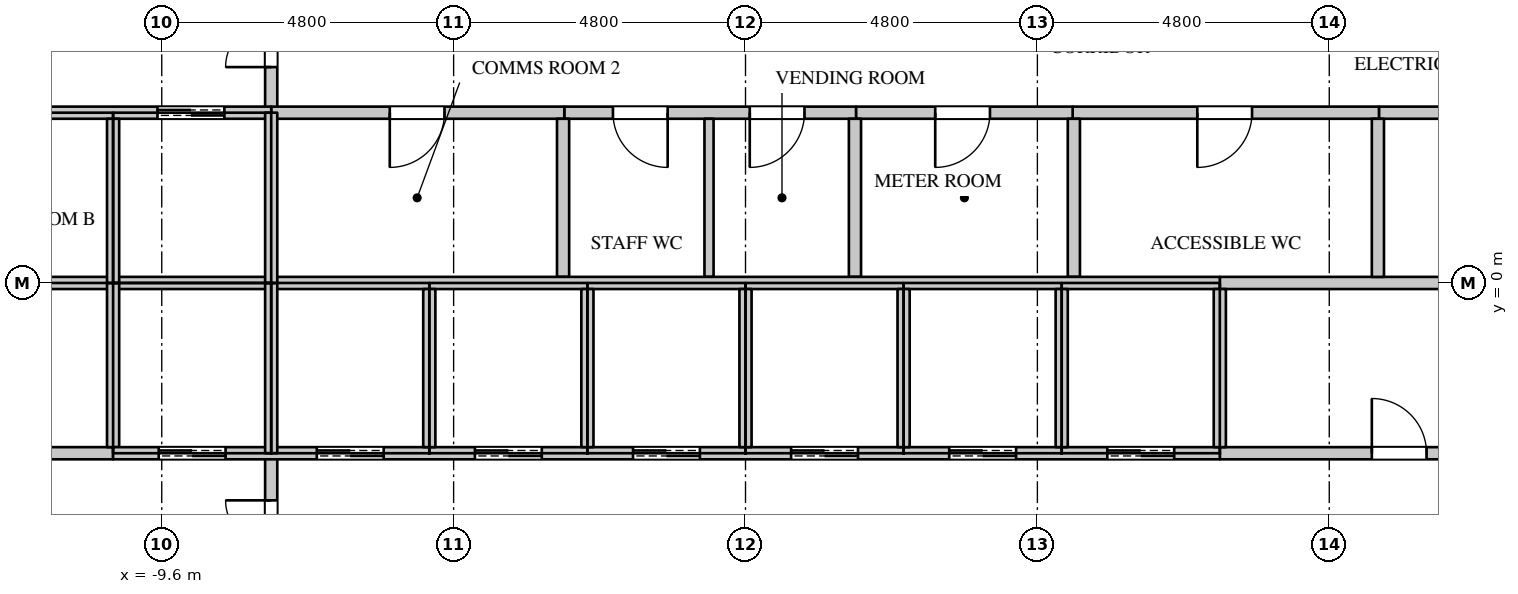
"""IFC4 building model, lengths in metres.
Left out: names, types, materials, properties, quantities, classifications, styles, units other than length and angle.
Written with IfcOpenShell. Run it as: python <this file> out.ifc"""

import sys

from ifc_helpers import new_model, si_unit, direction, frame, frame_2d, origin, place, context, subcontext, project, spatial, rectangle, extrude, element, fill, save


model = new_model("IFC4")
c1 = context("Model", 3, precision=1e-05, world=origin(), true_north=direction((0.0, 1.0)))
c2 = subcontext(c1, "Body", "Model", "MODEL_VIEW")
j1 = project(units=[si_unit("LENGTHUNIT", "METRE"), si_unit("PLANEANGLEUNIT", "RADIAN")], contexts=[c1])
p1 = place(None, origin())
s1 = spatial("IfcSite", under=j1, at=p1, CompositionType="ELEMENT")
p2 = place(p1, origin())
s2 = spatial("IfcBuilding", under=s1, at=p2, CompositionType="ELEMENT")
p3 = place(p2, frame((0.0, 0.0, 187.5)))
s3 = spatial("IfcBuildingStorey", under=s2, at=p3, CompositionType="ELEMENT", Elevation=187.5)
p4 = place(p3, frame((-7.8, -8.075, 0.0), z_axis=(0.0, 0.0, 1.0), x_axis=(0.0, 1.0, 0.0)))
e1 = element("IfcWall", 1, at=p4, inside=s3, PredefinedType="PARTITIONING", context=c2, shape_type="SweptSolid", body=[
    extrude(rectangle(XDim=5.275, YDim=0.2, at=frame_2d((2.637, 0.0))), origin(), (0.0, 0.0, 1.0), 3.95),
])
p5 = place(p4, frame((3.0, 0.0, 0.0)))
e2 = element("IfcOpeningElement", 2, at=p5, cuts=e1, PredefinedType="OPENING", context=c2, shape_type="SweptSolid", body=[
    extrude(rectangle(XDim=1.5, YDim=2.4, at=frame_2d((0.75, 1.2))), frame((0.0, 0.11, 0.0), z_axis=(0.0, -1.0, 0.0), x_axis=(1.0, 0.0, 0.0)), (0.0, 0.0, 1.0), 0.22),
])
p6 = place(p3, frame((-7.8, 2.8, 0.0), z_axis=(0.0, 0.0, 1.0), x_axis=(0.0, 1.0, 0.0)))
e3 = element("IfcWall", 3, at=p6, inside=s3, PredefinedType="PARTITIONING", context=c2, shape_type="SweptSolid", body=[
    extrude(rectangle(XDim=5.275, YDim=0.2, at=frame_2d((2.637, 0.0))), origin(), (0.0, 0.0, 1.0), 3.95),
])
p7 = place(p6, frame((0.75, 0.0, 0.0)))
e4 = element("IfcOpeningElement", 4, at=p7, cuts=e3, PredefinedType="OPENING", context=c2, shape_type="SweptSolid", body=[
    extrude(rectangle(XDim=1.5, YDim=2.4, at=frame_2d((0.75, 1.2))), frame((0.0, 0.11, 0.0), z_axis=(0.0, -1.0, 0.0), x_axis=(1.0, 0.0, 0.0)), (0.0, 0.0, 1.0), 0.22),
])
p8 = place(p3, frame((-2.98, 2.8, 0.0), z_axis=(0.0, 0.0, 1.0), x_axis=(1.0, 0.0, 0.0)))
e5 = element("IfcWall", 5, at=p8, inside=s3, PredefinedType="PARTITIONING", context=c2, shape_type="SweptSolid", body=[
    extrude(rectangle(XDim=4.8, YDim=0.2, at=frame_2d((2.4, 0.0))), origin(), (0.0, 0.0, 1.0), 3.95),
])
p9 = place(p8, frame((0.8, 0.0, 0.0)))
e6 = element("IfcOpeningElement", 6, at=p9, cuts=e5, PredefinedType="OPENING", context=c2, shape_type="SweptSolid", body=[
    extrude(rectangle(XDim=0.9, YDim=2.2, at=frame_2d((0.45, 1.1))), frame((0.0, 0.11, 0.0), z_axis=(0.0, -1.0, 0.0), x_axis=(1.0, 0.0, 0.0)), (0.0, 0.0, 1.0), 0.22),
])
p10 = place(p8, frame((3.05, 0.0, 0.0)))
e7 = element("IfcOpeningElement", 7, at=p10, cuts=e5, PredefinedType="OPENING", context=c2, shape_type="SweptSolid", body=[
    extrude(rectangle(XDim=0.9, YDim=2.2, at=frame_2d((0.45, 1.1))), frame((0.0, 0.11, 0.0), z_axis=(0.0, -1.0, 0.0), x_axis=(1.0, 0.0, 0.0)), (0.0, 0.0, 1.0), 0.22),
])
p11 = place(p3, frame((5.38, 2.8, 0.0), z_axis=(0.0, 0.0, 1.0), x_axis=(1.0, 0.0, 0.0)))
e8 = element("IfcWall", 8, at=p11, inside=s3, PredefinedType="PARTITIONING", context=c2, shape_type="SweptSolid", body=[
    extrude(rectangle(XDim=5.04, YDim=0.2, at=frame_2d((2.52, 0.0))), origin(), (0.0, 0.0, 1.0), 3.95),
])
p12 = place(p11, frame((2.05, 0.0, 0.0)))
e9 = element("IfcOpeningElement", 9, at=p12, cuts=e8, PredefinedType="OPENING", context=c2, shape_type="SweptSolid", body=[
    extrude(rectangle(XDim=0.9, YDim=2.2, at=frame_2d((0.45, 1.1))), frame((0.0, 0.11, 0.0), z_axis=(0.0, -1.0, 0.0), x_axis=(1.0, 0.0, 0.0)), (0.0, 0.0, 1.0), 0.22),
])
p13 = place(p3, frame((-0.6, 0.1, 0.0), z_axis=(0.0, 0.0, 1.0), x_axis=(0.0, 1.0, 0.0)))
e10 = element("IfcWall", 10, at=p13, inside=s3, PredefinedType="PARTITIONING", context=c2, shape_type="SweptSolid", body=[
    extrude(rectangle(XDim=2.6, YDim=0.15, at=frame_2d((1.3, 0.0))), origin(), (0.0, 0.0, 1.0), 3.95),
])
p14 = place(p3, frame((-13.67, -2.8, 0.0), z_axis=(0.0, 0.0, 1.0), x_axis=(1.0, 0.0, 0.0)))
e11 = element("IfcWall", 11, at=p14, inside=s3, PredefinedType="PARTITIONING", context=c2, shape_type="SweptSolid", body=[
    extrude(rectangle(XDim=3.27, YDim=0.2, at=frame_2d((1.635, 0.0))), origin(), (0.0, 0.0, 1.0), 3.95),
])
p15 = place(p14, frame((1.3, 0.0, 0.0)))
e12 = element("IfcOpeningElement", 12, at=p15, cuts=e11, PredefinedType="OPENING", context=c2, shape_type="SweptSolid", body=[
    extrude(rectangle(XDim=0.6, YDim=2.0, at=frame_2d((0.3, 1.0))), frame((0.0, 0.11, 0.0), z_axis=(0.0, -1.0, 0.0), x_axis=(1.0, 0.0, 0.0)), (0.0, 0.0, 1.0), 0.22),
])
p16 = place(p3, frame((-7.8, 2.8, 0.0), z_axis=(0.0, 0.0, 1.0), x_axis=(1.0, 0.0, 0.0)))
e13 = element("IfcWall", 13, at=p16, inside=s3, PredefinedType="PARTITIONING", context=c2, shape_type="SweptSolid", body=[
    extrude(rectangle(XDim=4.82, YDim=0.2, at=frame_2d((2.41, 0.0))), origin(), (0.0, 0.0, 1.0), 3.95),
])
p17 = place(p16, frame((1.95, 0.0, 0.0)))
e14 = element("IfcOpeningElement", 14, at=p17, cuts=e13, PredefinedType="OPENING", context=c2, shape_type="SweptSolid", body=[
    extrude(rectangle(XDim=0.9, YDim=2.2, at=frame_2d((0.45, 1.1))), frame((0.0, 0.11, 0.0), z_axis=(0.0, -1.0, 0.0), x_axis=(1.0, 0.0, 0.0)), (0.0, 0.0, 1.0), 0.22),
])
p18 = place(p3, frame((-3.0, 0.1, 0.0), z_axis=(0.0, 0.0, 1.0), x_axis=(0.0, 1.0, 0.0)))
e15 = element("IfcWall", 15, at=p18, inside=s3, PredefinedType="PARTITIONING", context=c2, shape_type="SweptSolid", body=[
    extrude(rectangle(XDim=2.6, YDim=0.2, at=frame_2d((1.3, 0.0))), origin(), (0.0, 0.0, 1.0), 3.95),
])
p19 = place(p3, frame((1.82, 2.8, 0.0), z_axis=(0.0, 0.0, 1.0), x_axis=(1.0, 0.0, 0.0)))
e16 = element("IfcWall", 16, at=p19, inside=s3, PredefinedType="PARTITIONING", context=c2, shape_type="SweptSolid", body=[
    extrude(rectangle(XDim=3.56, YDim=0.2, at=frame_2d((1.78, 0.0))), origin(), (0.0, 0.0, 1.0), 3.95),
])
p20 = place(p19, frame((1.3, 0.0, 0.0)))
e17 = element("IfcOpeningElement", 17, at=p20, cuts=e16, PredefinedType="OPENING", context=c2, shape_type="SweptSolid", body=[
    extrude(rectangle(XDim=0.9, YDim=2.2, at=frame_2d((0.45, 1.1))), frame((0.0, 0.11, 0.0), z_axis=(0.0, -1.0, 0.0), x_axis=(1.0, 0.0, 0.0)), (0.0, 0.0, 1.0), 0.22),
])
for number, where, z_axis, x_axis in (
    (18, (1.8, 0.1, 0.0), (0.0, 0.0, 1.0), (0.0, 1.0, 0.0)),
    (19, (5.4, 0.1, 0.0), (0.0, 0.0, 1.0), (0.0, 1.0, 0.0)),
):
    element("IfcWall", number, at=place(p3, frame(where, z_axis=z_axis, x_axis=x_axis)), inside=s3, PredefinedType="PARTITIONING", context=c2, shape_type="SweptSolid", body=[
        extrude(rectangle(XDim=2.6, YDim=0.2, at=frame_2d((1.3, 0.0))), origin(), (0.0, 0.0, 1.0), 3.95),
    ])
p21 = place(p3, frame((7.8, -2.8, 0.0), z_axis=(0.0, 0.0, 1.0), x_axis=(1.0, 0.0, 0.0)))
e20 = element("IfcWall", 20, at=p21, inside=s3, PredefinedType="PARTITIONING", context=c2, shape_type="SweptSolid", body=[
    extrude(rectangle(XDim=5.87, YDim=0.2, at=frame_2d((2.935, 0.0))), origin(), (0.0, 0.0, 1.0), 3.95),
])
p22 = place(p21, frame((2.5, 0.0, 0.0)))
e21 = element("IfcOpeningElement", 21, at=p22, cuts=e20, PredefinedType="OPENING", context=c2, shape_type="SweptSolid", body=[
    extrude(rectangle(XDim=0.9, YDim=2.2, at=frame_2d((0.45, 1.1))), frame((0.0, 0.11, 0.0), z_axis=(0.0, -1.0, 0.0), x_axis=(1.0, 0.0, 0.0)), (0.0, 0.0, 1.0), 0.22),
])
p23 = place(p3, frame((7.8, 0.0, 0.0), z_axis=(0.0, 0.0, 1.0), x_axis=(1.0, 0.0, 0.0)))
e22 = element("IfcWall", 22, at=p23, inside=s3, PredefinedType="PARTITIONING", context=c2, shape_type="SweptSolid", body=[
    extrude(rectangle(XDim=5.87, YDim=0.2, at=frame_2d((2.935, 0.0))), origin(), (0.0, 0.0, 1.0), 3.95),
])
p24 = place(p3, frame((10.42, 2.8, 0.0), z_axis=(0.0, 0.0, 1.0), x_axis=(1.0, 0.0, 0.0)))
e23 = element("IfcWall", 23, at=p24, inside=s3, PredefinedType="PARTITIONING", context=c2, shape_type="SweptSolid", body=[
    extrude(rectangle(XDim=3.25, YDim=0.2, at=frame_2d((1.625, 0.0))), origin(), (0.0, 0.0, 1.0), 3.95),
])
p25 = place(p24, frame((1.3, 0.0, 0.0)))
e24 = element("IfcOpeningElement", 24, at=p25, cuts=e23, PredefinedType="OPENING", context=c2, shape_type="SweptSolid", body=[
    extrude(rectangle(XDim=0.6, YDim=2.0, at=frame_2d((0.3, 1.0))), frame((0.0, 0.11, 0.0), z_axis=(0.0, -1.0, 0.0), x_axis=(1.0, 0.0, 0.0)), (0.0, 0.0, 1.0), 0.22),
])
p26 = place(p3, frame((10.4, 0.1, 0.0), z_axis=(0.0, 0.0, 1.0), x_axis=(0.0, 1.0, 0.0)))
e25 = element("IfcWall", 25, at=p26, inside=s3, PredefinedType="PARTITIONING", context=c2, shape_type="SweptSolid", body=[
    extrude(rectangle(XDim=2.6, YDim=0.2, at=frame_2d((1.3, 0.0))), origin(), (0.0, 0.0, 1.0), 3.95),
])
p27 = place(p3, frame((-13.67, 0.0, 0.0), z_axis=(0.0, 0.0, 1.0), x_axis=(1.0, 0.0, 0.0)))
e26 = element("IfcWall", 26, at=p27, inside=s3, PredefinedType="PARTITIONING", context=c2, shape_type="SweptSolid", body=[
    extrude(rectangle(XDim=21.47, YDim=0.2, at=frame_2d((10.735, 0.0))), origin(), (0.0, 0.0, 1.0), 3.95),
])
p28 = place(p3, frame((-13.67, 2.8, 0.0), z_axis=(0.0, 0.0, 1.0), x_axis=(1.0, 0.0, 0.0)))
e27 = element("IfcWall", 27, at=p28, inside=s3, PredefinedType="PARTITIONING", context=c2, shape_type="SweptSolid", body=[
    extrude(rectangle(XDim=5.87, YDim=0.2, at=frame_2d((2.935, 0.0))), origin(), (0.0, 0.0, 1.0), 3.95),
])
p29 = place(p28, frame((1.05, 0.0, 0.0)))
e28 = element("IfcOpeningElement", 28, at=p29, cuts=e27, PredefinedType="OPENING", context=c2, shape_type="SweptSolid", body=[
    extrude(rectangle(XDim=1.1, YDim=2.2, at=frame_2d((0.55, 1.1))), frame((0.0, 0.11, 0.0), z_axis=(0.0, -1.0, 0.0), x_axis=(1.0, 0.0, 0.0)), (0.0, 0.0, 1.0), 0.22),
])
p30 = place(p28, frame((4.0, 0.0, 0.0)))
e29 = element("IfcOpeningElement", 29, at=p30, cuts=e27, PredefinedType="OPENING", context=c2, shape_type="SweptSolid", body=[
    extrude(rectangle(XDim=1.1, YDim=2.2, at=frame_2d((0.55, 1.1))), frame((0.0, 0.11, 0.0), z_axis=(0.0, -1.0, 0.0), x_axis=(1.0, 0.0, 0.0)), (0.0, 0.0, 1.0), 0.22),
])
p31 = place(p3, frame((-10.4, -2.7, 0.0), z_axis=(0.0, 0.0, 1.0), x_axis=(0.0, 1.0, 0.0)))
e30 = element("IfcWall", 30, at=p31, inside=s3, PredefinedType="PARTITIONING", context=c2, shape_type="SweptSolid", body=[
    extrude(rectangle(XDim=2.7, YDim=0.2, at=frame_2d((1.35, 0.0))), origin(), (0.0, 0.0, 1.0), 3.95),
])
p32 = place(p3, frame((-10.4, -2.8, 0.0), z_axis=(0.0, 0.0, 1.0), x_axis=(1.0, 0.0, 0.0)))
e31 = element("IfcWall", 31, at=p32, inside=s3, PredefinedType="PARTITIONING", context=c2, shape_type="SweptSolid", body=[
    extrude(rectangle(XDim=18.2, YDim=0.2, at=frame_2d((9.1, 0.0))), origin(), (0.0, 0.0, 1.0), 3.95),
])
p33 = place(p32, frame((0.75, 0.0, 0.0)))
e32 = element("IfcOpeningElement", 32, at=p33, cuts=e31, PredefinedType="OPENING", context=c2, shape_type="SweptSolid", body=[
    extrude(rectangle(XDim=1.1, YDim=2.2, at=frame_2d((0.55, 1.1))), frame((0.0, 0.11, 0.0), z_axis=(0.0, -1.0, 0.0), x_axis=(1.0, 0.0, 0.0)), (0.0, 0.0, 1.0), 0.22),
])
p34 = place(p32, frame((3.35, 0.0, 0.0)))
e33 = element("IfcOpeningElement", 33, at=p34, cuts=e31, PredefinedType="OPENING", context=c2, shape_type="SweptSolid", body=[
    extrude(rectangle(XDim=1.1, YDim=2.2, at=frame_2d((0.55, 1.1))), frame((0.0, 0.11, 0.0), z_axis=(0.0, -1.0, 0.0), x_axis=(1.0, 0.0, 0.0)), (0.0, 0.0, 1.0), 0.22),
])
p35 = place(p32, frame((5.95, 0.0, 0.0)))
e34 = element("IfcOpeningElement", 34, at=p35, cuts=e31, PredefinedType="OPENING", context=c2, shape_type="SweptSolid", body=[
    extrude(rectangle(XDim=1.1, YDim=2.2, at=frame_2d((0.55, 1.1))), frame((0.0, 0.11, 0.0), z_axis=(0.0, -1.0, 0.0), x_axis=(1.0, 0.0, 0.0)), (0.0, 0.0, 1.0), 0.22),
])
p36 = place(p32, frame((8.55, 0.0, 0.0)))
e35 = element("IfcOpeningElement", 35, at=p36, cuts=e31, PredefinedType="OPENING", context=c2, shape_type="SweptSolid", body=[
    extrude(rectangle(XDim=1.1, YDim=2.2, at=frame_2d((0.55, 1.1))), frame((0.0, 0.11, 0.0), z_axis=(0.0, -1.0, 0.0), x_axis=(1.0, 0.0, 0.0)), (0.0, 0.0, 1.0), 0.22),
])
p37 = place(p32, frame((11.15, 0.0, 0.0)))
e36 = element("IfcOpeningElement", 36, at=p37, cuts=e31, PredefinedType="OPENING", context=c2, shape_type="SweptSolid", body=[
    extrude(rectangle(XDim=1.1, YDim=2.2, at=frame_2d((0.55, 1.1))), frame((0.0, 0.11, 0.0), z_axis=(0.0, -1.0, 0.0), x_axis=(1.0, 0.0, 0.0)), (0.0, 0.0, 1.0), 0.22),
])
p38 = place(p32, frame((13.75, 0.0, 0.0)))
e37 = element("IfcOpeningElement", 37, at=p38, cuts=e31, PredefinedType="OPENING", context=c2, shape_type="SweptSolid", body=[
    extrude(rectangle(XDim=1.1, YDim=2.2, at=frame_2d((0.55, 1.1))), frame((0.0, 0.11, 0.0), z_axis=(0.0, -1.0, 0.0), x_axis=(1.0, 0.0, 0.0)), (0.0, 0.0, 1.0), 0.22),
])
p39 = place(p32, frame((16.35, 0.0, 0.0)))
e38 = element("IfcOpeningElement", 38, at=p39, cuts=e31, PredefinedType="OPENING", context=c2, shape_type="SweptSolid", body=[
    extrude(rectangle(XDim=1.1, YDim=2.2, at=frame_2d((0.55, 1.1))), frame((0.0, 0.11, 0.0), z_axis=(0.0, -1.0, 0.0), x_axis=(1.0, 0.0, 0.0)), (0.0, 0.0, 1.0), 0.22),
])
p40 = place(p3, frame((-10.4, 0.0, 0.0), z_axis=(0.0, 0.0, 1.0), x_axis=(0.0, 1.0, 0.0)))
e39 = element("IfcWall", 39, at=p40, inside=s3, PredefinedType="PARTITIONING", context=c2, shape_type="SweptSolid", body=[
    extrude(rectangle(XDim=2.7, YDim=0.2, at=frame_2d((1.35, 0.0))), origin(), (0.0, 0.0, 1.0), 3.95),
])
for number, where, z_axis, x_axis in (
    (40, (-7.8, -2.8, 0.0), (0.0, 0.0, 1.0), (0.0, 1.0, 0.0)),
    (41, (-7.8, 0.0, 0.0), (0.0, 0.0, 1.0), (0.0, 1.0, 0.0)),
):
    element("IfcWall", number, at=place(p3, frame(where, z_axis=z_axis, x_axis=x_axis)), inside=s3, PredefinedType="PARTITIONING", context=c2, shape_type="SweptSolid", body=[
        extrude(rectangle(XDim=2.8, YDim=0.2, at=frame_2d((1.4, 0.0))), origin(), (0.0, 0.0, 1.0), 3.95),
    ])
for number, where, z_axis, x_axis in (
    (42, (-5.2, -2.7, 0.0), (0.0, 0.0, 1.0), (0.0, 1.0, 0.0)),
    (43, (-2.6, -2.7, 0.0), (0.0, 0.0, 1.0), (0.0, 1.0, 0.0)),
    (44, (0.0, -2.7, 0.0), (0.0, 0.0, 1.0), (0.0, 1.0, 0.0)),
    (45, (2.6, -2.7, 0.0), (0.0, 0.0, 1.0), (0.0, 1.0, 0.0)),
    (46, (5.2, -2.7, 0.0), (0.0, 0.0, 1.0), (0.0, 1.0, 0.0)),
    (47, (7.8, -2.7, 0.0), (0.0, 0.0, 1.0), (0.0, 1.0, 0.0)),
):
    element("IfcWall", number, at=place(p3, frame(where, z_axis=z_axis, x_axis=x_axis)), inside=s3, PredefinedType="PARTITIONING", context=c2, shape_type="SweptSolid", body=[
        extrude(rectangle(XDim=2.6, YDim=0.2, at=frame_2d((1.3, 0.0))), origin(), (0.0, 0.0, 1.0), 3.95),
    ])
p41 = place(p22, origin())
e48 = element("IfcDoor", 48, at=p41, inside=s3, OperationType="SINGLE_SWING_LEFT", PredefinedType="DOOR", context=c2, shape_type="SweptSolid", body=[
    extrude(rectangle(XDim=0.9, YDim=2.2, at=frame_2d((0.45, 1.1))), frame((0.0, 0.025, 0.0), z_axis=(0.0, -1.0, 0.0), x_axis=(1.0, 0.0, 0.0)), (0.0, 0.0, 1.0), 0.05),
])
fill(e21, e48)
p42 = place(p17, origin())
e49 = element("IfcDoor", 49, at=p42, inside=s3, OperationType="SINGLE_SWING_RIGHT", PredefinedType="DOOR", context=c2, shape_type="SweptSolid", body=[
    extrude(rectangle(XDim=0.9, YDim=2.2, at=frame_2d((0.45, 1.1))), frame((0.0, 0.025, 0.0), z_axis=(0.0, -1.0, 0.0), x_axis=(1.0, 0.0, 0.0)), (0.0, 0.0, 1.0), 0.05),
])
fill(e14, e49)
p43 = place(p9, origin())
e50 = element("IfcDoor", 50, at=p43, inside=s3, OperationType="SINGLE_SWING_LEFT", PredefinedType="DOOR", context=c2, shape_type="SweptSolid", body=[
    extrude(rectangle(XDim=0.9, YDim=2.2, at=frame_2d((0.45, 1.1))), frame((0.0, 0.025, 0.0), z_axis=(0.0, -1.0, 0.0), x_axis=(1.0, 0.0, 0.0)), (0.0, 0.0, 1.0), 0.05),
])
fill(e6, e50)
p44 = place(p10, origin())
e51 = element("IfcDoor", 51, at=p44, inside=s3, OperationType="SINGLE_SWING_RIGHT", PredefinedType="DOOR", context=c2, shape_type="SweptSolid", body=[
    extrude(rectangle(XDim=0.9, YDim=2.2, at=frame_2d((0.45, 1.1))), frame((0.0, 0.025, 0.0), z_axis=(0.0, -1.0, 0.0), x_axis=(1.0, 0.0, 0.0)), (0.0, 0.0, 1.0), 0.05),
])
fill(e7, e51)
p45 = place(p20, origin())
e52 = element("IfcDoor", 52, at=p45, inside=s3, OperationType="SINGLE_SWING_RIGHT", PredefinedType="DOOR", context=c2, shape_type="SweptSolid", body=[
    extrude(rectangle(XDim=0.9, YDim=2.2, at=frame_2d((0.45, 1.1))), frame((0.0, 0.025, 0.0), z_axis=(0.0, -1.0, 0.0), x_axis=(1.0, 0.0, 0.0)), (0.0, 0.0, 1.0), 0.05),
])
fill(e17, e52)
p46 = place(p12, origin())
e53 = element("IfcDoor", 53, at=p46, inside=s3, OperationType="SINGLE_SWING_RIGHT", PredefinedType="DOOR", context=c2, shape_type="SweptSolid", body=[
    extrude(rectangle(XDim=0.9, YDim=2.2, at=frame_2d((0.45, 1.1))), frame((0.0, 0.025, 0.0), z_axis=(0.0, -1.0, 0.0), x_axis=(1.0, 0.0, 0.0)), (0.0, 0.0, 1.0), 0.05),
])
fill(e9, e53)
p47 = place(p30, origin())
e54 = element("IfcDoor", 54, at=p47, inside=s3, OperationType="DOUBLE_DOOR_SLIDING", PredefinedType="DOOR", context=c2, shape_type="SweptSolid", body=[
    extrude(rectangle(XDim=1.1, YDim=2.2, at=frame_2d((0.55, 1.1))), frame((0.0, 0.025, 0.0), z_axis=(0.0, -1.0, 0.0), x_axis=(1.0, 0.0, 0.0)), (0.0, 0.0, 1.0), 0.05),
])
fill(e29, e54)
p48 = place(p33, origin())
e55 = element("IfcDoor", 55, at=p48, inside=s3, OperationType="DOUBLE_DOOR_SLIDING", PredefinedType="DOOR", context=c2, shape_type="SweptSolid", body=[
    extrude(rectangle(XDim=1.1, YDim=2.2, at=frame_2d((0.55, 1.1))), frame((0.0, 0.025, 0.0), z_axis=(0.0, -1.0, 0.0), x_axis=(1.0, 0.0, 0.0)), (0.0, 0.0, 1.0), 0.05),
])
fill(e32, e55)
p49 = place(p34, origin())
e56 = element("IfcDoor", 56, at=p49, inside=s3, OperationType="DOUBLE_DOOR_SLIDING", PredefinedType="DOOR", context=c2, shape_type="SweptSolid", body=[
    extrude(rectangle(XDim=1.1, YDim=2.2, at=frame_2d((0.55, 1.1))), frame((0.0, 0.025, 0.0), z_axis=(0.0, -1.0, 0.0), x_axis=(1.0, 0.0, 0.0)), (0.0, 0.0, 1.0), 0.05),
])
fill(e33, e56)
p50 = place(p35, origin())
e57 = element("IfcDoor", 57, at=p50, inside=s3, OperationType="DOUBLE_DOOR_SLIDING", PredefinedType="DOOR", context=c2, shape_type="SweptSolid", body=[
    extrude(rectangle(XDim=1.1, YDim=2.2, at=frame_2d((0.55, 1.1))), frame((0.0, 0.025, 0.0), z_axis=(0.0, -1.0, 0.0), x_axis=(1.0, 0.0, 0.0)), (0.0, 0.0, 1.0), 0.05),
])
fill(e34, e57)
p51 = place(p36, origin())
e58 = element("IfcDoor", 58, at=p51, inside=s3, OperationType="DOUBLE_DOOR_SLIDING", PredefinedType="DOOR", context=c2, shape_type="SweptSolid", body=[
    extrude(rectangle(XDim=1.1, YDim=2.2, at=frame_2d((0.55, 1.1))), frame((0.0, 0.025, 0.0), z_axis=(0.0, -1.0, 0.0), x_axis=(1.0, 0.0, 0.0)), (0.0, 0.0, 1.0), 0.05),
])
fill(e35, e58)
p52 = place(p37, origin())
e59 = element("IfcDoor", 59, at=p52, inside=s3, OperationType="DOUBLE_DOOR_SLIDING", PredefinedType="DOOR", context=c2, shape_type="SweptSolid", body=[
    extrude(rectangle(XDim=1.1, YDim=2.2, at=frame_2d((0.55, 1.1))), frame((0.0, 0.025, 0.0), z_axis=(0.0, -1.0, 0.0), x_axis=(1.0, 0.0, 0.0)), (0.0, 0.0, 1.0), 0.05),
])
fill(e36, e59)
p53 = place(p38, origin())
e60 = element("IfcDoor", 60, at=p53, inside=s3, OperationType="DOUBLE_DOOR_SLIDING", PredefinedType="DOOR", context=c2, shape_type="SweptSolid", body=[
    extrude(rectangle(XDim=1.1, YDim=2.2, at=frame_2d((0.55, 1.1))), frame((0.0, 0.025, 0.0), z_axis=(0.0, -1.0, 0.0), x_axis=(1.0, 0.0, 0.0)), (0.0, 0.0, 1.0), 0.05),
])
fill(e37, e60)
p54 = place(p39, origin())
e61 = element("IfcDoor", 61, at=p54, inside=s3, OperationType="DOUBLE_DOOR_SLIDING", PredefinedType="DOOR", context=c2, shape_type="SweptSolid", body=[
    extrude(rectangle(XDim=1.1, YDim=2.2, at=frame_2d((0.55, 1.1))), frame((0.0, 0.025, 0.0), z_axis=(0.0, -1.0, 0.0), x_axis=(1.0, 0.0, 0.0)), (0.0, 0.0, 1.0), 0.05),
])
fill(e38, e61)
p55 = place(p7, origin())
e62 = element("IfcDoor", 62, at=p55, inside=s3, OperationType="DOUBLE_DOOR_SINGLE_SWING", PredefinedType="DOOR", context=c2, shape_type="SweptSolid", body=[
    extrude(rectangle(XDim=1.5, YDim=2.4, at=frame_2d((0.75, 1.2))), frame((0.0, 0.025, 0.0), z_axis=(0.0, -1.0, 0.0), x_axis=(1.0, 0.0, 0.0)), (0.0, 0.0, 1.0), 0.05),
])
fill(e4, e62)
p56 = place(p5, origin())
e63 = element("IfcDoor", 63, at=p56, inside=s3, OperationType="DOUBLE_DOOR_SINGLE_SWING", PredefinedType="DOOR", context=c2, shape_type="SweptSolid", body=[
    extrude(rectangle(XDim=1.5, YDim=2.4, at=frame_2d((0.75, 1.2))), frame((0.0, 0.025, 0.0), z_axis=(0.0, -1.0, 0.0), x_axis=(1.0, 0.0, 0.0)), (0.0, 0.0, 1.0), 0.05),
])
fill(e2, e63)
save(model, sys.argv[1])
